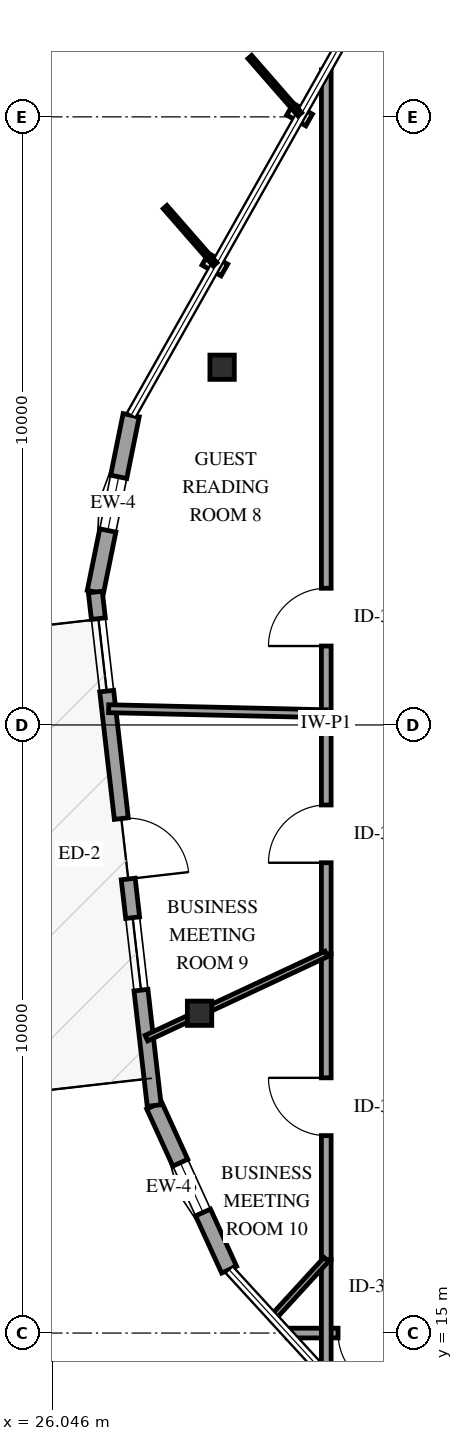
"""IFC4 building model, lengths in metres.
Left out: names, types, materials, properties, quantities, classifications, styles, units other than length and angle.
Written with IfcOpenShell. Run it as: python <this file> out.ifc"""

import sys

from ifc_helpers import new_model, si_unit, direction, frame, frame_2d, origin, origin_2d, place, context, subcontext, project, spatial, rectangle, i_section, extrude, element, fill, save


model = new_model("IFC4")
c1 = context("Model", 3, precision=1e-05, world=origin(), true_north=direction((0.0, 1.0)))
c2 = subcontext(c1, "Body", "Model", "MODEL_VIEW")
j1 = project(units=[si_unit("LENGTHUNIT", "METRE"), si_unit("PLANEANGLEUNIT", "RADIAN")], contexts=[c1])
p1 = place(None, origin())
s1 = spatial("IfcSite", under=j1, at=p1, CompositionType="ELEMENT")
p2 = place(p1, origin())
s2 = spatial("IfcBuilding", under=s1, at=p2, CompositionType="ELEMENT")
p3 = place(p2, frame((0.0, 0.0, 261.25)))
s3 = spatial("IfcBuildingStorey", under=s2, at=p3, CompositionType="ELEMENT", Elevation=261.25)
for number, where, z_axis, x_axis in (
    (1, (28.837, 30.883, 0.0), (0.0, 0.0, 1.0), (1.0, 0.0, 0.0)),
    (2, (28.466, 20.259, 0.0), (0.0, 0.0, 1.0), (1.0, 0.0, 0.0)),
):
    element("IfcColumn", number, at=place(p3, frame(where, z_axis=z_axis, x_axis=x_axis)), inside=s3, PredefinedType="COLUMN", context=c2, shape_type="SweptSolid", body=[
        extrude(i_section(OverallWidth=0.401, OverallDepth=0.399, WebThickness=0.025, FlangeThickness=0.04, FilletRadius=0.038, at=origin_2d()), origin(), (0.0, 0.0, 1.0), 3.75),
    ])
p4 = place(p3, frame((27.342, 30.093, 0.0), z_axis=(0.0, 0.0, 1.0), x_axis=(-0.198663496017, -0.980067760591, 0.0)))
e3 = element("IfcWall", 3, at=p4, inside=s3, PredefinedType="SOLIDWALL", context=c2, shape_type="SweptSolid", body=[
    extrude(rectangle(XDim=2.967, YDim=0.27, at=frame_2d((1.483, 0.0))), origin(), (0.0, 0.0, 1.0), 2.829),
])
p5 = place(p4, frame((1.033, 0.0, 0.75)))
e4 = element("IfcOpeningElement", 4, at=p5, cuts=e3, PredefinedType="OPENING", context=c2, shape_type="SweptSolid", body=[
    extrude(rectangle(XDim=0.9, YDim=1.5, at=frame_2d((0.45, 0.75))), frame((0.0, 0.145, 0.0), z_axis=(0.0, -1.0, 0.0), x_axis=(1.0, 0.0, 0.0)), (0.0, 0.0, 1.0), 0.29),
])
p6 = place(p3, frame((27.72, 18.741, 0.0), z_axis=(0.0, 0.0, 1.0), x_axis=(0.415364895304, -0.909654881672, 0.0)))
e5 = element("IfcWall", 5, at=p6, inside=s3, PredefinedType="SOLIDWALL", context=c2, shape_type="SweptSolid", body=[
    extrude(rectangle(XDim=2.967, YDim=0.27, at=frame_2d((1.483, 0.0))), origin(), (0.0, 0.0, 1.0), 2.829),
])
p7 = place(p6, frame((1.033, 0.0, 0.75)))
e6 = element("IfcOpeningElement", 6, at=p7, cuts=e5, PredefinedType="OPENING", context=c2, shape_type="SweptSolid", body=[
    extrude(rectangle(XDim=0.9, YDim=1.5, at=frame_2d((0.45, 0.75))), frame((0.0, 0.145, 0.0), z_axis=(0.0, -1.0, 0.0), x_axis=(1.0, 0.0, 0.0)), (0.0, 0.0, 1.0), 0.29),
])
p8 = place(p3, frame((26.752, 27.186, 0.0), z_axis=(0.0, 0.0, 1.0), x_axis=(0.113886004552, -0.993493823819, 0.0)))
e7 = element("IfcWall", 7, at=p8, inside=s3, PredefinedType="SOLIDWALL", context=c2, shape_type="SweptSolid", body=[
    extrude(rectangle(XDim=8.5, YDim=0.23, at=frame_2d((4.25, 0.0))), origin(), (0.0, 0.0, 1.0), 2.829),
])
p9 = place(p8, frame((3.75, 0.0, 0.0)))
e8 = element("IfcOpeningElement", 8, at=p9, cuts=e7, PredefinedType="OPENING", context=c2, shape_type="SweptSolid", body=[
    extrude(rectangle(XDim=1.0, YDim=2.15, at=frame_2d((0.5, 1.075))), frame((0.0, 0.125, 0.0), z_axis=(0.0, -1.0, 0.0), x_axis=(1.0, 0.0, 0.0)), (0.0, 0.0, 1.0), 0.25),
])
p10 = place(p8, frame((0.44, 0.0, 0.72)))
e9 = element("IfcOpeningElement", 9, at=p10, cuts=e7, PredefinedType="OPENING", context=c2, shape_type="SweptSolid", body=[
    extrude(rectangle(XDim=1.2, YDim=1.6, at=frame_2d((0.6, 0.8))), frame((0.0, 0.125, 0.0), z_axis=(0.0, -1.0, 0.0), x_axis=(1.0, 0.0, 0.0)), (0.0, 0.0, 1.0), 0.25),
])
p11 = place(p8, frame((5.39, 0.0, 0.72)))
e10 = element("IfcOpeningElement", 10, at=p11, cuts=e7, PredefinedType="OPENING", context=c2, shape_type="SweptSolid", body=[
    extrude(rectangle(XDim=1.2, YDim=1.6, at=frame_2d((0.6, 0.8))), frame((0.0, 0.125, 0.0), z_axis=(0.0, -1.0, 0.0), x_axis=(1.0, 0.0, 0.0)), (0.0, 0.0, 1.0), 0.25),
])
p12 = place(p3, frame((30.55, 25.185, 0.0), z_axis=(0.0, 0.0, 1.0), x_axis=(0.0, 1.0, 0.0)))
e11 = element("IfcWall", 11, at=p12, inside=s3, PredefinedType="PARTITIONING", context=c2, shape_type="SweptSolid", body=[
    extrude(rectangle(XDim=10.588, YDim=0.16, at=frame_2d((5.294, 0.0))), origin(), (0.0, 0.0, 1.0), 3.45),
])
p13 = place(p12, frame((1.113, 0.0, 0.0)))
e12 = element("IfcOpeningElement", 12, at=p13, cuts=e11, PredefinedType="OPENING", context=c2, shape_type="SweptSolid", body=[
    extrude(rectangle(XDim=0.95, YDim=2.15, at=frame_2d((0.475, 1.075))), frame((0.0, 0.09, 0.0), z_axis=(0.0, -1.0, 0.0), x_axis=(1.0, 0.0, 0.0)), (0.0, 0.0, 1.0), 0.18),
])
p14 = place(p3, frame((30.55, 16.21, 0.0), z_axis=(0.0, 0.0, 1.0), x_axis=(0.0, 1.0, 0.0)))
e13 = element("IfcWall", 13, at=p14, inside=s3, PredefinedType="PARTITIONING", context=c2, shape_type="SweptSolid", body=[
    extrude(rectangle(XDim=5.024, YDim=0.16, at=frame_2d((2.512, 0.0))), origin(), (0.0, 0.0, 1.0), 3.45),
])
p15 = place(p14, frame((2.037, 0.0, 0.0)))
e14 = element("IfcOpeningElement", 14, at=p15, cuts=e13, PredefinedType="OPENING", context=c2, shape_type="SweptSolid", body=[
    extrude(rectangle(XDim=0.95, YDim=2.15, at=frame_2d((0.475, 1.075))), frame((0.0, 0.09, 0.0), z_axis=(0.0, -1.0, 0.0), x_axis=(1.0, 0.0, 0.0)), (0.0, 0.0, 1.0), 0.18),
])
p16 = place(p3, frame((30.55, 21.234, 0.0), z_axis=(0.0, 0.0, 1.0), x_axis=(0.0, 1.0, 0.0)))
e15 = element("IfcWall", 15, at=p16, inside=s3, PredefinedType="PARTITIONING", context=c2, shape_type="SweptSolid", body=[
    extrude(rectangle(XDim=3.951, YDim=0.16, at=frame_2d((1.976, 0.0))), origin(), (0.0, 0.0, 1.0), 3.45),
])
p17 = place(p16, frame((1.5, 0.0, 0.0)))
e16 = element("IfcOpeningElement", 16, at=p17, cuts=e15, PredefinedType="OPENING", context=c2, shape_type="SweptSolid", body=[
    extrude(rectangle(XDim=0.95, YDim=2.15, at=frame_2d((0.475, 1.075))), frame((0.0, 0.09, 0.0), z_axis=(0.0, -1.0, 0.0), x_axis=(1.0, 0.0, 0.0)), (0.0, 0.0, 1.0), 0.18),
])
p18 = place(p3, frame((30.55, 25.185, 0.0), z_axis=(0.0, 0.0, 1.0), x_axis=(-0.999737308215, 0.022919741782, 0.0)))
e17 = element("IfcWall", 17, at=p18, inside=s3, PredefinedType="PARTITIONING", context=c2, shape_type="SweptSolid", body=[
    extrude(rectangle(XDim=3.579, YDim=0.13, at=frame_2d((1.79, 0.0))), origin(), (0.0, 0.0, 1.0), 3.45),
])
p19 = place(p3, frame((30.55, 21.234, 0.0), z_axis=(0.0, 0.0, 1.0), x_axis=(-0.905731763404, -0.423851356917, 0.0)))
e18 = element("IfcWall", 18, at=p19, inside=s3, PredefinedType="PARTITIONING", context=c2, shape_type="SweptSolid", body=[
    extrude(rectangle(XDim=3.265, YDim=0.1, at=frame_2d((1.632, 0.0))), origin(), (0.0, 0.0, 1.0), 3.45),
])
p20 = place(p3, frame((32.53, 15.0, 0.0), z_axis=(0.0, 0.0, 1.0), x_axis=(-1.0, 0.0, 0.0)))
e19 = element("IfcWall", 19, at=p20, inside=s3, PredefinedType="PARTITIONING", context=c2, shape_type="SweptSolid", body=[
    extrude(rectangle(XDim=2.621, YDim=0.16, at=frame_2d((1.311, 0.0))), origin(), (0.0, 0.0, 1.0), 3.45),
])
p21 = place(p20, frame((0.836, 0.0, 0.0)))
e20 = element("IfcOpeningElement", 20, at=p21, cuts=e19, PredefinedType="OPENING", context=c2, shape_type="SweptSolid", body=[
    extrude(rectangle(XDim=0.95, YDim=2.15, at=frame_2d((0.475, 1.075))), frame((0.0, 0.09, 0.0), z_axis=(0.0, -1.0, 0.0), x_axis=(1.0, 0.0, 0.0)), (0.0, 0.0, 1.0), 0.18),
])
p22 = place(p3, frame((30.55, 14.302, 0.0), z_axis=(0.0, 0.0, 1.0), x_axis=(0.0, 1.0, 0.0)))
e21 = element("IfcWall", 21, at=p22, inside=s3, PredefinedType="PARTITIONING", context=c2, shape_type="SweptSolid", body=[
    extrude(rectangle(XDim=1.908, YDim=0.16, at=frame_2d((0.954, 0.0))), origin(), (0.0, 0.0, 1.0), 3.45),
])
p23 = place(p3, frame((30.55, 16.21, 0.0), z_axis=(0.0, 0.0, 1.0), x_axis=(-0.67551976153, -0.737341882563, 0.0)))
e22 = element("IfcWall", 22, at=p23, inside=s3, PredefinedType="PARTITIONING", context=c2, shape_type="SweptSolid", body=[
    extrude(rectangle(XDim=1.295, YDim=0.1, at=frame_2d((0.648, 0.0))), origin(), (0.0, 0.0, 1.0), 3.45),
])
p24 = place(p5, origin())
e23 = element("IfcWindow", 23, at=p24, inside=s3, PartitioningType="SINGLE_PANEL", PredefinedType="WINDOW", context=c2, shape_type="SweptSolid", body=[
    extrude(rectangle(XDim=0.9, YDim=1.5, at=frame_2d((0.45, 0.75))), frame((0.0, 0.03, 0.0), z_axis=(0.0, -1.0, 0.0), x_axis=(1.0, 0.0, 0.0)), (0.0, 0.0, 1.0), 0.06),
])
fill(e4, e23)
p25 = place(p7, origin())
e24 = element("IfcWindow", 24, at=p25, inside=s3, PartitioningType="SINGLE_PANEL", PredefinedType="WINDOW", context=c2, shape_type="SweptSolid", body=[
    extrude(rectangle(XDim=0.9, YDim=1.5, at=frame_2d((0.45, 0.75))), frame((0.0, 0.03, 0.0), z_axis=(0.0, -1.0, 0.0), x_axis=(1.0, 0.0, 0.0)), (0.0, 0.0, 1.0), 0.06),
])
fill(e6, e24)
p26 = place(p9, origin())
e25 = element("IfcDoor", 25, at=p26, inside=s3, OperationType="SINGLE_SWING_RIGHT", PredefinedType="DOOR", context=c2, shape_type="SweptSolid", body=[
    extrude(rectangle(XDim=1.0, YDim=2.15, at=frame_2d((0.5, 1.075))), frame((0.0, 0.025, 0.0), z_axis=(0.0, -1.0, 0.0), x_axis=(1.0, 0.0, 0.0)), (0.0, 0.0, 1.0), 0.05),
])
fill(e8, e25)
p27 = place(p10, origin())
e26 = element("IfcWindow", 26, at=p27, inside=s3, PartitioningType="SINGLE_PANEL", PredefinedType="WINDOW", context=c2, shape_type="SweptSolid", body=[
    extrude(rectangle(XDim=1.2, YDim=1.6, at=frame_2d((0.6, 0.8))), frame((0.0, 0.03, 0.0), z_axis=(0.0, -1.0, 0.0), x_axis=(1.0, 0.0, 0.0)), (0.0, 0.0, 1.0), 0.06),
])
fill(e9, e26)
p28 = place(p11, origin())
e27 = element("IfcWindow", 27, at=p28, inside=s3, PartitioningType="SINGLE_PANEL", PredefinedType="WINDOW", context=c2, shape_type="SweptSolid", body=[
    extrude(rectangle(XDim=1.2, YDim=1.6, at=frame_2d((0.6, 0.8))), frame((0.0, 0.03, 0.0), z_axis=(0.0, -1.0, 0.0), x_axis=(1.0, 0.0, 0.0)), (0.0, 0.0, 1.0), 0.06),
])
fill(e10, e27)
p29 = place(p13, origin())
e28 = element("IfcDoor", 28, at=p29, inside=s3, OperationType="SINGLE_SWING_LEFT", PredefinedType="DOOR", context=c2, shape_type="SweptSolid", body=[
    extrude(rectangle(XDim=0.95, YDim=2.15, at=frame_2d((0.475, 1.075))), frame((0.0, 0.025, 0.0), z_axis=(0.0, -1.0, 0.0), x_axis=(1.0, 0.0, 0.0)), (0.0, 0.0, 1.0), 0.05),
])
fill(e12, e28)
p30 = place(p15, origin())
e29 = element("IfcDoor", 29, at=p30, inside=s3, OperationType="SINGLE_SWING_RIGHT", PredefinedType="DOOR", context=c2, shape_type="SweptSolid", body=[
    extrude(rectangle(XDim=0.95, YDim=2.15, at=frame_2d((0.475, 1.075))), frame((0.0, 0.025, 0.0), z_axis=(0.0, -1.0, 0.0), x_axis=(1.0, 0.0, 0.0)), (0.0, 0.0, 1.0), 0.05),
])
fill(e14, e29)
p31 = place(p17, origin())
e30 = element("IfcDoor", 30, at=p31, inside=s3, OperationType="SINGLE_SWING_LEFT", PredefinedType="DOOR", context=c2, shape_type="SweptSolid", body=[
    extrude(rectangle(XDim=0.95, YDim=2.15, at=frame_2d((0.475, 1.075))), frame((0.0, 0.025, 0.0), z_axis=(0.0, -1.0, 0.0), x_axis=(1.0, 0.0, 0.0)), (0.0, 0.0, 1.0), 0.05),
])
fill(e16, e30)
p32 = place(p21, origin())
e31 = element("IfcDoor", 31, at=p32, inside=s3, OperationType="SINGLE_SWING_LEFT", PredefinedType="DOOR", context=c2, shape_type="SweptSolid", body=[
    extrude(rectangle(XDim=0.95, YDim=2.15, at=frame_2d((0.475, 1.075))), frame((0.0, 0.025, 0.0), z_axis=(0.0, -1.0, 0.0), x_axis=(1.0, 0.0, 0.0)), (0.0, 0.0, 1.0), 0.05),
])
fill(e20, e31)
save(model, sys.argv[1])
